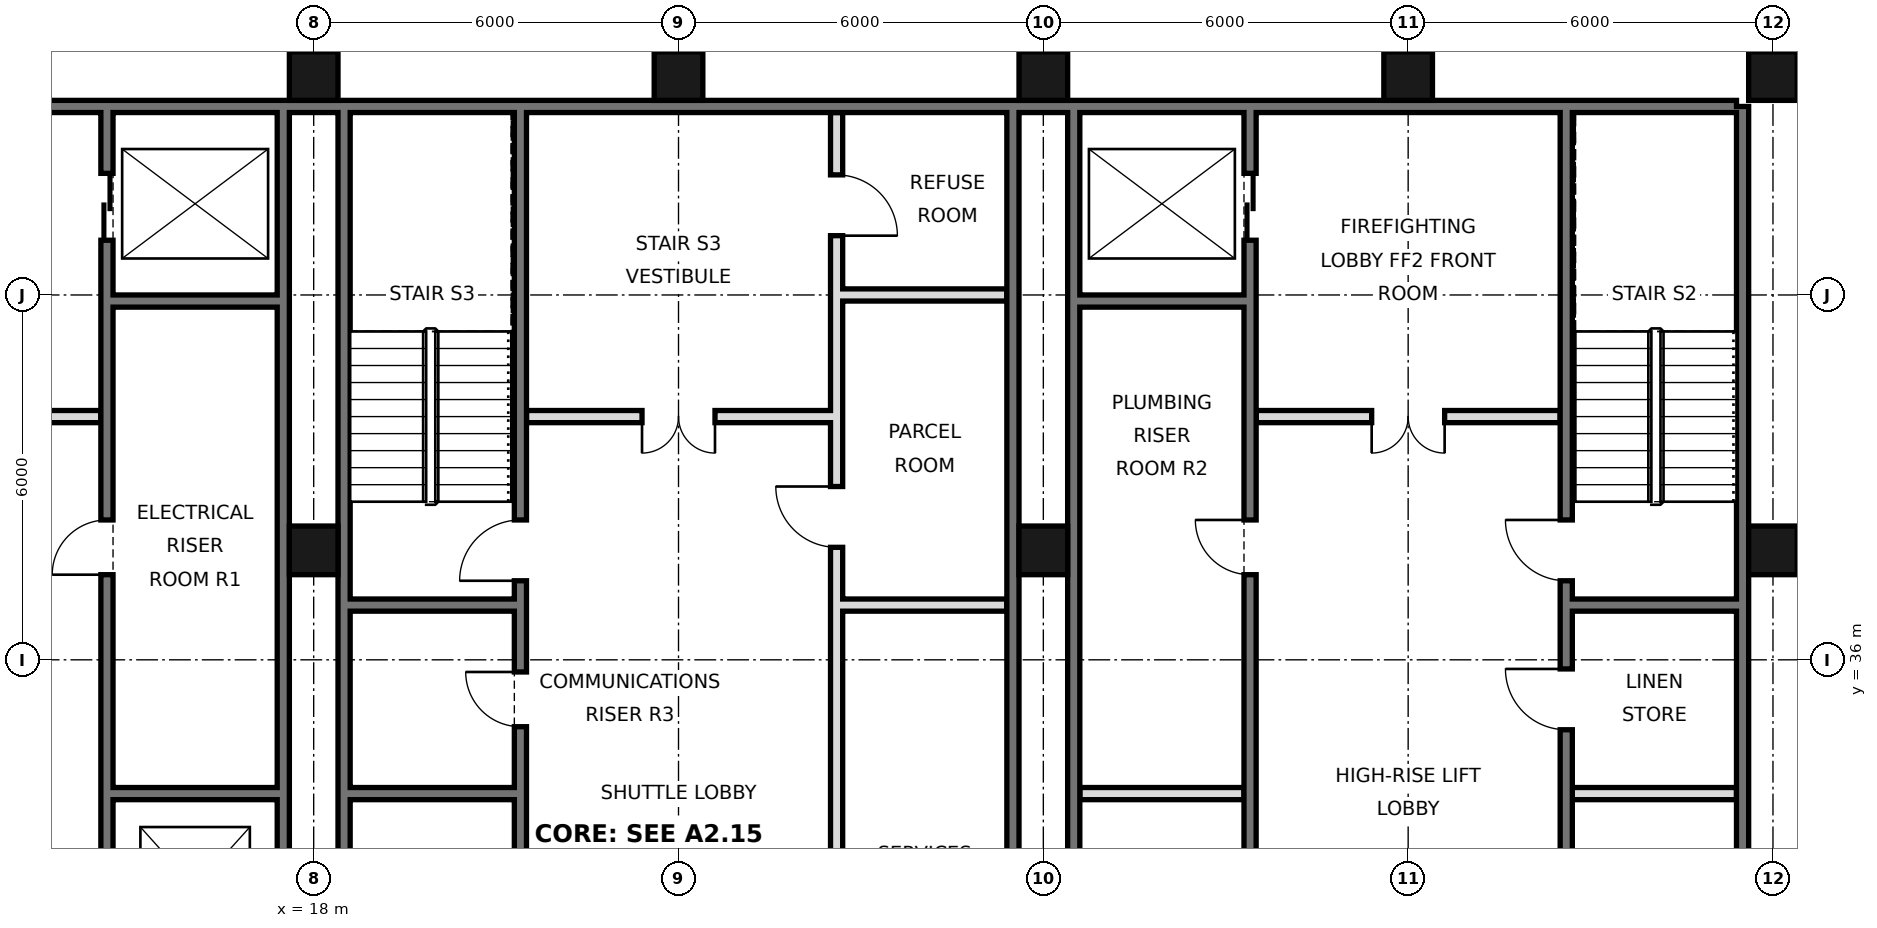
"""IFC4 building model, lengths in metres.
Left out: names, types, materials, properties, quantities, classifications, styles, units other than length and angle.
Written with IfcOpenShell. Run it as: python <this file> out.ifc"""

import sys

from ifc_helpers import new_model, si_unit, direction, frame, frame_2d, origin, origin_2d, place, context, subcontext, project, spatial, rectangle, hollow_rectangle, extrude, element, fill, save


model = new_model("IFC4")
c1 = context("Model", 3, precision=1e-05, world=origin(), true_north=direction((0.0, 1.0)))
c2 = subcontext(c1, "Body", "Model", "MODEL_VIEW")
j1 = project(units=[si_unit("LENGTHUNIT", "METRE"), si_unit("PLANEANGLEUNIT", "RADIAN")], contexts=[c1])
p1 = place(None, origin())
s1 = spatial("IfcSite", under=j1, at=p1, CompositionType="ELEMENT")
p2 = place(p1, origin())
s2 = spatial("IfcBuilding", under=s1, at=p2, CompositionType="ELEMENT")
p3 = place(p2, frame((0.0, 0.0, 60.6)))
s3 = spatial("IfcBuildingStorey", under=s2, at=p3, CompositionType="ELEMENT", Elevation=60.6)
for number, where, z_axis, x_axis in (
    (1, (18.0, 37.8, 0.0), (0.0, 0.0, 1.0), (1.0, 0.0, 0.0)),
    (2, (18.0, 45.6, 0.0), (0.0, 0.0, 1.0), (1.0, 0.0, 0.0)),
    (3, (24.0, 45.6, 0.0), (0.0, 0.0, 1.0), (1.0, 0.0, 0.0)),
    (4, (30.0, 37.8, 0.0), (0.0, 0.0, 1.0), (1.0, 0.0, 0.0)),
    (5, (30.0, 45.6, 0.0), (0.0, 0.0, 1.0), (1.0, 0.0, 0.0)),
    (6, (36.0, 45.6, 0.0), (0.0, 0.0, 1.0), (1.0, 0.0, 0.0)),
    (7, (42.0, 37.8, 0.0), (0.0, 0.0, 1.0), (1.0, 0.0, 0.0)),
    (8, (42.0, 45.6, 0.0), (0.0, 0.0, 1.0), (1.0, 0.0, 0.0)),
):
    element("IfcColumn", number, at=place(p3, frame(where, z_axis=z_axis, x_axis=x_axis)), inside=s3, PredefinedType="COLUMN", context=c2, shape_type="SweptSolid", body=[
        extrude(hollow_rectangle(XDim=0.8, YDim=0.8, WallThickness=0.06, at=origin_2d()), origin(), (0.0, 0.0, 1.0), 3.6),
    ])
p4 = place(p3, frame((41.5, 21.6, 0.0), z_axis=(0.0, 0.0, 1.0), x_axis=(0.0, 1.0, 0.0)))
e9 = element("IfcWall", 9, at=p4, inside=s3, PredefinedType="SOLIDWALL", context=c2, shape_type="SweptSolid", body=[
    extrude(rectangle(XDim=23.5, YDim=0.2, at=frame_2d((11.75, 0.0))), origin(), (0.0, 0.0, 1.0), 3.42),
])
p5 = place(p3, frame((6.6, 45.1, 0.0), z_axis=(0.0, 0.0, 1.0), x_axis=(1.0, 0.0, 0.0)))
e10 = element("IfcWall", 10, at=p5, inside=s3, PredefinedType="SOLIDWALL", context=c2, shape_type="SweptSolid", body=[
    extrude(rectangle(XDim=34.8, YDim=0.2, at=frame_2d((17.4, 0.0))), origin(), (0.0, 0.0, 1.0), 3.42),
])
for number, where, z_axis, x_axis in (
    (11, (17.5, 27.6, 0.0), (0.0, 0.0, 1.0), (0.0, 1.0, 0.0)),
    (12, (18.5, 27.6, 0.0), (0.0, 0.0, 1.0), (0.0, 1.0, 0.0)),
    (13, (29.5, 27.6, 0.0), (0.0, 0.0, 1.0), (0.0, 1.0, 0.0)),
    (14, (30.5, 27.6, 0.0), (0.0, 0.0, 1.0), (0.0, 1.0, 0.0)),
):
    element("IfcWall", number, at=place(p3, frame(where, z_axis=z_axis, x_axis=x_axis)), inside=s3, PredefinedType="SOLIDWALL", context=c2, shape_type="SweptSolid", body=[
        extrude(rectangle(XDim=17.5, YDim=0.2, at=frame_2d((8.75, 0.0))), origin(), (0.0, 0.0, 1.0), 3.42),
    ])
p6 = place(p3, frame((14.6, 27.5, 0.0), z_axis=(0.0, 0.0, 1.0), x_axis=(0.0, 1.0, 0.0)))
e15 = element("IfcWall", 15, at=p6, inside=s3, PredefinedType="SOLIDWALL", context=c2, shape_type="SweptSolid", body=[
    extrude(rectangle(XDim=17.5, YDim=0.2, at=frame_2d((8.75, 0.0))), origin(), (0.0, 0.0, 1.0), 3.42),
])
p7 = place(p6, frame((1.1, 0.0, 0.0)))
e16 = element("IfcOpeningElement", 16, at=p7, cuts=e15, PredefinedType="OPENING", context=c2, shape_type="SweptSolid", body=[
    extrude(rectangle(XDim=1.1, YDim=2.1, at=frame_2d((0.55, 1.05))), frame((0.0, 0.11, 0.0), z_axis=(0.0, -1.0, 0.0), x_axis=(1.0, 0.0, 0.0)), (0.0, 0.0, 1.0), 0.22),
])
p8 = place(p6, frame((4.2, 0.0, 0.0)))
e17 = element("IfcOpeningElement", 17, at=p8, cuts=e15, PredefinedType="OPENING", context=c2, shape_type="SweptSolid", body=[
    extrude(rectangle(XDim=1.1, YDim=2.1, at=frame_2d((0.55, 1.05))), frame((0.0, 0.11, 0.0), z_axis=(0.0, -1.0, 0.0), x_axis=(1.0, 0.0, 0.0)), (0.0, 0.0, 1.0), 0.22),
])
p9 = place(p6, frame((15.4, 0.0, 0.0)))
e18 = element("IfcOpeningElement", 18, at=p9, cuts=e15, PredefinedType="OPENING", context=c2, shape_type="SweptSolid", body=[
    extrude(rectangle(XDim=1.1, YDim=2.1, at=frame_2d((0.55, 1.05))), frame((0.0, 0.11, 0.0), z_axis=(0.0, -1.0, 0.0), x_axis=(1.0, 0.0, 0.0)), (0.0, 0.0, 1.0), 0.22),
])
p10 = place(p6, frame((9.9, 0.0, 0.0)))
e19 = element("IfcOpeningElement", 19, at=p10, cuts=e15, PredefinedType="OPENING", context=c2, shape_type="SweptSolid", body=[
    extrude(rectangle(XDim=0.9, YDim=2.1, at=frame_2d((0.45, 1.05))), frame((0.0, 0.11, 0.0), z_axis=(0.0, -1.0, 0.0), x_axis=(1.0, 0.0, 0.0)), (0.0, 0.0, 1.0), 0.22),
])
p11 = place(p3, frame((21.4, 27.5, 0.0), z_axis=(0.0, 0.0, 1.0), x_axis=(0.0, 1.0, 0.0)))
e20 = element("IfcWall", 20, at=p11, inside=s3, PredefinedType="SOLIDWALL", context=c2, shape_type="SweptSolid", body=[
    extrude(rectangle(XDim=17.5, YDim=0.2, at=frame_2d((8.75, 0.0))), origin(), (0.0, 0.0, 1.0), 3.42),
])
p12 = place(p11, frame((9.8, 0.0, 0.0)))
e21 = element("IfcOpeningElement", 21, at=p12, cuts=e20, PredefinedType="OPENING", context=c2, shape_type="SweptSolid", body=[
    extrude(rectangle(XDim=1.0, YDim=2.1, at=frame_2d((0.5, 1.05))), frame((0.0, 0.11, 0.0), z_axis=(0.0, -1.0, 0.0), x_axis=(1.0, 0.0, 0.0)), (0.0, 0.0, 1.0), 0.22),
])
p13 = place(p11, frame((7.4, 0.0, 0.0)))
e22 = element("IfcOpeningElement", 22, at=p13, cuts=e20, PredefinedType="OPENING", context=c2, shape_type="SweptSolid", body=[
    extrude(rectangle(XDim=0.9, YDim=2.1, at=frame_2d((0.45, 1.05))), frame((0.0, 0.11, 0.0), z_axis=(0.0, -1.0, 0.0), x_axis=(1.0, 0.0, 0.0)), (0.0, 0.0, 1.0), 0.22),
])
p14 = place(p3, frame((26.6, 27.5, 0.0), z_axis=(0.0, 0.0, 1.0), x_axis=(0.0, 1.0, 0.0)))
e23 = element("IfcWall", 23, at=p14, inside=s3, PredefinedType="SOLIDWALL", context=c2, shape_type="SweptSolid", body=[
    extrude(rectangle(XDim=17.5, YDim=0.2, at=frame_2d((8.75, 0.0))), origin(), (0.0, 0.0, 1.0), 3.42),
])
p15 = place(p14, frame((4.3, 0.0, 0.0)))
e24 = element("IfcOpeningElement", 24, at=p15, cuts=e23, PredefinedType="OPENING", context=c2, shape_type="SweptSolid", body=[
    extrude(rectangle(XDim=0.9, YDim=2.1, at=frame_2d((0.45, 1.05))), frame((0.0, 0.11, 0.0), z_axis=(0.0, -1.0, 0.0), x_axis=(1.0, 0.0, 0.0)), (0.0, 0.0, 1.0), 0.22),
])
p16 = place(p14, frame((10.35, 0.0, 0.0)))
e25 = element("IfcOpeningElement", 25, at=p16, cuts=e23, PredefinedType="OPENING", context=c2, shape_type="SweptSolid", body=[
    extrude(rectangle(XDim=1.0, YDim=2.1, at=frame_2d((0.5, 1.05))), frame((0.0, 0.11, 0.0), z_axis=(0.0, -1.0, 0.0), x_axis=(1.0, 0.0, 0.0)), (0.0, 0.0, 1.0), 0.22),
])
p17 = place(p14, frame((15.475, 0.0, 0.0)))
e26 = element("IfcOpeningElement", 26, at=p17, cuts=e23, PredefinedType="OPENING", context=c2, shape_type="SweptSolid", body=[
    extrude(rectangle(XDim=1.0, YDim=2.1, at=frame_2d((0.5, 1.05))), frame((0.0, 0.11, 0.0), z_axis=(0.0, -1.0, 0.0), x_axis=(1.0, 0.0, 0.0)), (0.0, 0.0, 1.0), 0.22),
])
p18 = place(p3, frame((33.4, 27.5, 0.0), z_axis=(0.0, 0.0, 1.0), x_axis=(0.0, 1.0, 0.0)))
e27 = element("IfcWall", 27, at=p18, inside=s3, PredefinedType="SOLIDWALL", context=c2, shape_type="SweptSolid", body=[
    extrude(rectangle(XDim=17.5, YDim=0.2, at=frame_2d((8.75, 0.0))), origin(), (0.0, 0.0, 1.0), 3.42),
])
p19 = place(p18, frame((15.4, 0.0, 0.0)))
e28 = element("IfcOpeningElement", 28, at=p19, cuts=e27, PredefinedType="OPENING", context=c2, shape_type="SweptSolid", body=[
    extrude(rectangle(XDim=1.1, YDim=2.1, at=frame_2d((0.55, 1.05))), frame((0.0, 0.11, 0.0), z_axis=(0.0, -1.0, 0.0), x_axis=(1.0, 0.0, 0.0)), (0.0, 0.0, 1.0), 0.22),
])
p20 = place(p18, frame((2.7, 0.0, 0.0)))
e29 = element("IfcOpeningElement", 29, at=p20, cuts=e27, PredefinedType="OPENING", context=c2, shape_type="SweptSolid", body=[
    extrude(rectangle(XDim=1.0, YDim=2.1, at=frame_2d((0.5, 1.05))), frame((0.0, 0.11, 0.0), z_axis=(0.0, -1.0, 0.0), x_axis=(1.0, 0.0, 0.0)), (0.0, 0.0, 1.0), 0.22),
])
p21 = place(p18, frame((9.9, 0.0, 0.0)))
e30 = element("IfcOpeningElement", 30, at=p21, cuts=e27, PredefinedType="OPENING", context=c2, shape_type="SweptSolid", body=[
    extrude(rectangle(XDim=0.9, YDim=2.1, at=frame_2d((0.45, 1.05))), frame((0.0, 0.11, 0.0), z_axis=(0.0, -1.0, 0.0), x_axis=(1.0, 0.0, 0.0)), (0.0, 0.0, 1.0), 0.22),
])
p22 = place(p3, frame((38.6, 21.6, 0.0), z_axis=(0.0, 0.0, 1.0), x_axis=(0.0, 1.0, 0.0)))
e31 = element("IfcWall", 31, at=p22, inside=s3, PredefinedType="SOLIDWALL", context=c2, shape_type="SweptSolid", body=[
    extrude(rectangle(XDim=23.4, YDim=0.2, at=frame_2d((11.7, 0.0))), origin(), (0.0, 0.0, 1.0), 3.42),
])
p23 = place(p22, frame((8.6, 0.0, 0.0)))
e32 = element("IfcOpeningElement", 32, at=p23, cuts=e31, PredefinedType="OPENING", context=c2, shape_type="SweptSolid", body=[
    extrude(rectangle(XDim=1.0, YDim=2.1, at=frame_2d((0.5, 1.05))), frame((0.0, 0.11, 0.0), z_axis=(0.0, -1.0, 0.0), x_axis=(1.0, 0.0, 0.0)), (0.0, 0.0, 1.0), 0.22),
])
p24 = place(p22, frame((13.25, 0.0, 0.0)))
e33 = element("IfcOpeningElement", 33, at=p24, cuts=e31, PredefinedType="OPENING", context=c2, shape_type="SweptSolid", body=[
    extrude(rectangle(XDim=1.0, YDim=2.1, at=frame_2d((0.5, 1.05))), frame((0.0, 0.11, 0.0), z_axis=(0.0, -1.0, 0.0), x_axis=(1.0, 0.0, 0.0)), (0.0, 0.0, 1.0), 0.22),
])
p25 = place(p22, frame((15.7, 0.0, 0.0)))
e34 = element("IfcOpeningElement", 34, at=p25, cuts=e31, PredefinedType="OPENING", context=c2, shape_type="SweptSolid", body=[
    extrude(rectangle(XDim=1.0, YDim=2.1, at=frame_2d((0.5, 1.05))), frame((0.0, 0.11, 0.0), z_axis=(0.0, -1.0, 0.0), x_axis=(1.0, 0.0, 0.0)), (0.0, 0.0, 1.0), 0.22),
])
p26 = place(p22, frame((0.175, 0.0, 0.0)))
e35 = element("IfcOpeningElement", 35, at=p26, cuts=e31, PredefinedType="OPENING", context=c2, shape_type="SweptSolid", body=[
    extrude(rectangle(XDim=0.9, YDim=2.1, at=frame_2d((0.45, 1.05))), frame((0.0, 0.11, 0.0), z_axis=(0.0, -1.0, 0.0), x_axis=(1.0, 0.0, 0.0)), (0.0, 0.0, 1.0), 0.22),
])
for number, where, z_axis, x_axis in (
    (36, (14.7, 33.8, 0.0), (0.0, 0.0, 1.0), (1.0, 0.0, 0.0)),
    (37, (18.6, 33.8, 0.0), (0.0, 0.0, 1.0), (1.0, 0.0, 0.0)),
    (38, (30.6, 33.8, 0.0), (0.0, 0.0, 1.0), (1.0, 0.0, 0.0)),
):
    element("IfcWall", number, at=place(p3, frame(where, z_axis=z_axis, x_axis=x_axis)), inside=s3, PredefinedType="SOLIDWALL", context=c2, shape_type="SweptSolid", body=[
        extrude(rectangle(XDim=2.7, YDim=0.2, at=frame_2d((1.35, 0.0))), origin(), (0.0, 0.0, 1.0), 3.42),
    ])
p27 = place(p3, frame((38.7, 33.8, 0.0), z_axis=(0.0, 0.0, 1.0), x_axis=(1.0, 0.0, 0.0)))
e39 = element("IfcWall", 39, at=p27, inside=s3, PredefinedType="PARTITIONING", context=c2, shape_type="SweptSolid", body=[
    extrude(rectangle(XDim=2.7, YDim=0.2, at=frame_2d((1.35, 0.0))), origin(), (0.0, 0.0, 1.0), 3.42),
])
for number, where, z_axis, x_axis in (
    (40, (18.6, 36.9, 0.0), (0.0, 0.0, 1.0), (1.0, 0.0, 0.0)),
    (41, (26.7, 36.9, 0.0), (0.0, 0.0, 1.0), (1.0, 0.0, 0.0)),
    (42, (38.7, 36.9, 0.0), (0.0, 0.0, 1.0), (1.0, 0.0, 0.0)),
):
    element("IfcWall", number, at=place(p3, frame(where, z_axis=z_axis, x_axis=x_axis)), inside=s3, PredefinedType="SOLIDWALL", context=c2, shape_type="SweptSolid", body=[
        extrude(rectangle(XDim=2.7, YDim=0.2, at=frame_2d((1.35, 0.0))), origin(), (0.0, 0.0, 1.0), 3.42),
    ])
p28 = place(p3, frame((21.5, 40.0, 0.0), z_axis=(0.0, 0.0, 1.0), x_axis=(1.0, 0.0, 0.0)))
e43 = element("IfcWall", 43, at=p28, inside=s3, PredefinedType="PARTITIONING", context=c2, shape_type="SweptSolid", body=[
    extrude(rectangle(XDim=5.0, YDim=0.2, at=frame_2d((2.5, 0.0))), origin(), (0.0, 0.0, 1.0), 3.42),
])
p29 = place(p28, frame((1.9, 0.0, 0.0)))
e44 = element("IfcOpeningElement", 44, at=p29, cuts=e43, PredefinedType="OPENING", context=c2, shape_type="SweptSolid", body=[
    extrude(rectangle(XDim=1.2, YDim=2.1, at=frame_2d((0.6, 1.05))), frame((0.0, 0.11, 0.0), z_axis=(0.0, -1.0, 0.0), x_axis=(1.0, 0.0, 0.0)), (0.0, 0.0, 1.0), 0.22),
])
p30 = place(p3, frame((33.5, 40.0, 0.0), z_axis=(0.0, 0.0, 1.0), x_axis=(1.0, 0.0, 0.0)))
e45 = element("IfcWall", 45, at=p30, inside=s3, PredefinedType="PARTITIONING", context=c2, shape_type="SweptSolid", body=[
    extrude(rectangle(XDim=5.0, YDim=0.2, at=frame_2d((2.5, 0.0))), origin(), (0.0, 0.0, 1.0), 3.42),
])
p31 = place(p30, frame((1.9, 0.0, 0.0)))
e46 = element("IfcOpeningElement", 46, at=p31, cuts=e45, PredefinedType="OPENING", context=c2, shape_type="SweptSolid", body=[
    extrude(rectangle(XDim=1.2, YDim=2.1, at=frame_2d((0.6, 1.05))), frame((0.0, 0.11, 0.0), z_axis=(0.0, -1.0, 0.0), x_axis=(1.0, 0.0, 0.0)), (0.0, 0.0, 1.0), 0.22),
])
p32 = place(p3, frame((9.5, 40.0, 0.0), z_axis=(0.0, 0.0, 1.0), x_axis=(1.0, 0.0, 0.0)))
e47 = element("IfcWall", 47, at=p32, inside=s3, PredefinedType="PARTITIONING", context=c2, shape_type="SweptSolid", body=[
    extrude(rectangle(XDim=5.0, YDim=0.2, at=frame_2d((2.5, 0.0))), origin(), (0.0, 0.0, 1.0), 3.42),
])
p33 = place(p32, frame((1.9, 0.0, 0.0)))
e48 = element("IfcOpeningElement", 48, at=p33, cuts=e47, PredefinedType="OPENING", context=c2, shape_type="SweptSolid", body=[
    extrude(rectangle(XDim=1.2, YDim=2.1, at=frame_2d((0.6, 1.05))), frame((0.0, 0.11, 0.0), z_axis=(0.0, -1.0, 0.0), x_axis=(1.0, 0.0, 0.0)), (0.0, 0.0, 1.0), 0.22),
])
for number, where, z_axis, x_axis in (
    (49, (14.7, 41.9, 0.0), (0.0, 0.0, 1.0), (1.0, 0.0, 0.0)),
    (50, (30.6, 41.9, 0.0), (0.0, 0.0, 1.0), (1.0, 0.0, 0.0)),
):
    element("IfcWall", number, at=place(p3, frame(where, z_axis=z_axis, x_axis=x_axis)), inside=s3, PredefinedType="SOLIDWALL", context=c2, shape_type="SweptSolid", body=[
        extrude(rectangle(XDim=2.7, YDim=0.2, at=frame_2d((1.35, 0.0))), origin(), (0.0, 0.0, 1.0), 3.42),
    ])
p34 = place(p3, frame((26.7, 42.0, 0.0), z_axis=(0.0, 0.0, 1.0), x_axis=(1.0, 0.0, 0.0)))
e51 = element("IfcWall", 51, at=p34, inside=s3, PredefinedType="PARTITIONING", context=c2, shape_type="SweptSolid", body=[
    extrude(rectangle(XDim=2.7, YDim=0.2, at=frame_2d((1.35, 0.0))), origin(), (0.0, 0.0, 1.0), 3.42),
])
p35 = place(p29, frame((1.2, 0.0, 0.0), z_axis=(0.0, 0.0, 1.0), x_axis=(-1.0, 0.0, 0.0)))
e52 = element("IfcDoor", 52, at=p35, inside=s3, OperationType="DOUBLE_DOOR_SINGLE_SWING", PredefinedType="DOOR", context=c2, shape_type="SweptSolid", body=[
    extrude(rectangle(XDim=1.2, YDim=2.1, at=frame_2d((0.6, 1.05))), frame((0.0, 0.025, 0.0), z_axis=(0.0, -1.0, 0.0), x_axis=(1.0, 0.0, 0.0)), (0.0, 0.0, 1.0), 0.05),
])
fill(e44, e52)
p36 = place(p31, frame((1.2, 0.0, 0.0), z_axis=(0.0, 0.0, 1.0), x_axis=(-1.0, 0.0, 0.0)))
e53 = element("IfcDoor", 53, at=p36, inside=s3, OperationType="DOUBLE_DOOR_SINGLE_SWING", PredefinedType="DOOR", context=c2, shape_type="SweptSolid", body=[
    extrude(rectangle(XDim=1.2, YDim=2.1, at=frame_2d((0.6, 1.05))), frame((0.0, 0.025, 0.0), z_axis=(0.0, -1.0, 0.0), x_axis=(1.0, 0.0, 0.0)), (0.0, 0.0, 1.0), 0.05),
])
fill(e46, e53)
p37 = place(p19, origin())
e54 = element("IfcDoor", 54, at=p37, inside=s3, OperationType="DOUBLE_DOOR_SLIDING", PredefinedType="DOOR", context=c2, shape_type="SweptSolid", body=[
    extrude(rectangle(XDim=1.1, YDim=2.1, at=frame_2d((0.55, 1.05))), frame((0.0, 0.025, 0.0), z_axis=(0.0, -1.0, 0.0), x_axis=(1.0, 0.0, 0.0)), (0.0, 0.0, 1.0), 0.05),
])
fill(e28, e54)
p38 = place(p9, origin())
e55 = element("IfcDoor", 55, at=p38, inside=s3, OperationType="DOUBLE_DOOR_SLIDING", PredefinedType="DOOR", context=c2, shape_type="SweptSolid", body=[
    extrude(rectangle(XDim=1.1, YDim=2.1, at=frame_2d((0.55, 1.05))), frame((0.0, 0.025, 0.0), z_axis=(0.0, -1.0, 0.0), x_axis=(1.0, 0.0, 0.0)), (0.0, 0.0, 1.0), 0.05),
])
fill(e18, e55)
p39 = place(p24, frame((1.0, 0.0, 0.0), z_axis=(0.0, 0.0, 1.0), x_axis=(-1.0, 0.0, 0.0)))
e56 = element("IfcDoor", 56, at=p39, inside=s3, OperationType="SINGLE_SWING_LEFT", PredefinedType="DOOR", context=c2, shape_type="SweptSolid", body=[
    extrude(rectangle(XDim=1.0, YDim=2.1, at=frame_2d((0.5, 1.05))), frame((0.0, 0.025, 0.0), z_axis=(0.0, -1.0, 0.0), x_axis=(1.0, 0.0, 0.0)), (0.0, 0.0, 1.0), 0.05),
])
fill(e33, e56)
p40 = place(p25, frame((1.0, 0.0, 0.0), z_axis=(0.0, 0.0, 1.0), x_axis=(-1.0, 0.0, 0.0)))
e57 = element("IfcDoor", 57, at=p40, inside=s3, OperationType="SINGLE_SWING_LEFT", PredefinedType="DOOR", context=c2, shape_type="SweptSolid", body=[
    extrude(rectangle(XDim=1.0, YDim=2.1, at=frame_2d((0.5, 1.05))), frame((0.0, 0.025, 0.0), z_axis=(0.0, -1.0, 0.0), x_axis=(1.0, 0.0, 0.0)), (0.0, 0.0, 1.0), 0.05),
])
fill(e34, e57)
p41 = place(p12, origin())
e58 = element("IfcDoor", 58, at=p41, inside=s3, OperationType="SINGLE_SWING_LEFT", PredefinedType="DOOR", context=c2, shape_type="SweptSolid", body=[
    extrude(rectangle(XDim=1.0, YDim=2.1, at=frame_2d((0.5, 1.05))), frame((0.0, 0.025, 0.0), z_axis=(0.0, -1.0, 0.0), x_axis=(1.0, 0.0, 0.0)), (0.0, 0.0, 1.0), 0.05),
])
fill(e21, e58)
p42 = place(p10, origin())
e59 = element("IfcDoor", 59, at=p42, inside=s3, OperationType="SINGLE_SWING_LEFT", PredefinedType="DOOR", context=c2, shape_type="SweptSolid", body=[
    extrude(rectangle(XDim=0.9, YDim=2.1, at=frame_2d((0.45, 1.05))), frame((0.0, 0.025, 0.0), z_axis=(0.0, -1.0, 0.0), x_axis=(1.0, 0.0, 0.0)), (0.0, 0.0, 1.0), 0.05),
])
fill(e19, e59)
p43 = place(p21, frame((0.9, 0.0, 0.0), z_axis=(0.0, 0.0, 1.0), x_axis=(-1.0, 0.0, 0.0)))
e60 = element("IfcDoor", 60, at=p43, inside=s3, OperationType="SINGLE_SWING_LEFT", PredefinedType="DOOR", context=c2, shape_type="SweptSolid", body=[
    extrude(rectangle(XDim=0.9, YDim=2.1, at=frame_2d((0.45, 1.05))), frame((0.0, 0.025, 0.0), z_axis=(0.0, -1.0, 0.0), x_axis=(1.0, 0.0, 0.0)), (0.0, 0.0, 1.0), 0.05),
])
fill(e30, e60)
p44 = place(p13, frame((0.9, 0.0, 0.0), z_axis=(0.0, 0.0, 1.0), x_axis=(-1.0, 0.0, 0.0)))
e61 = element("IfcDoor", 61, at=p44, inside=s3, OperationType="SINGLE_SWING_LEFT", PredefinedType="DOOR", context=c2, shape_type="SweptSolid", body=[
    extrude(rectangle(XDim=0.9, YDim=2.1, at=frame_2d((0.45, 1.05))), frame((0.0, 0.025, 0.0), z_axis=(0.0, -1.0, 0.0), x_axis=(1.0, 0.0, 0.0)), (0.0, 0.0, 1.0), 0.05),
])
fill(e22, e61)
p45 = place(p16, frame((1.0, 0.0, 0.0), z_axis=(0.0, 0.0, 1.0), x_axis=(-1.0, 0.0, 0.0)))
e62 = element("IfcDoor", 62, at=p45, inside=s3, OperationType="SINGLE_SWING_LEFT", PredefinedType="DOOR", context=c2, shape_type="SweptSolid", body=[
    extrude(rectangle(XDim=1.0, YDim=2.1, at=frame_2d((0.5, 1.05))), frame((0.0, 0.025, 0.0), z_axis=(0.0, -1.0, 0.0), x_axis=(1.0, 0.0, 0.0)), (0.0, 0.0, 1.0), 0.05),
])
fill(e25, e62)
p46 = place(p17, frame((1.0, 0.0, 0.0), z_axis=(0.0, 0.0, 1.0), x_axis=(-1.0, 0.0, 0.0)))
e63 = element("IfcDoor", 63, at=p46, inside=s3, OperationType="SINGLE_SWING_RIGHT", PredefinedType="DOOR", context=c2, shape_type="SweptSolid", body=[
    extrude(rectangle(XDim=1.0, YDim=2.1, at=frame_2d((0.5, 1.05))), frame((0.0, 0.025, 0.0), z_axis=(0.0, -1.0, 0.0), x_axis=(1.0, 0.0, 0.0)), (0.0, 0.0, 1.0), 0.05),
])
fill(e26, e63)
save(model, sys.argv[1])
